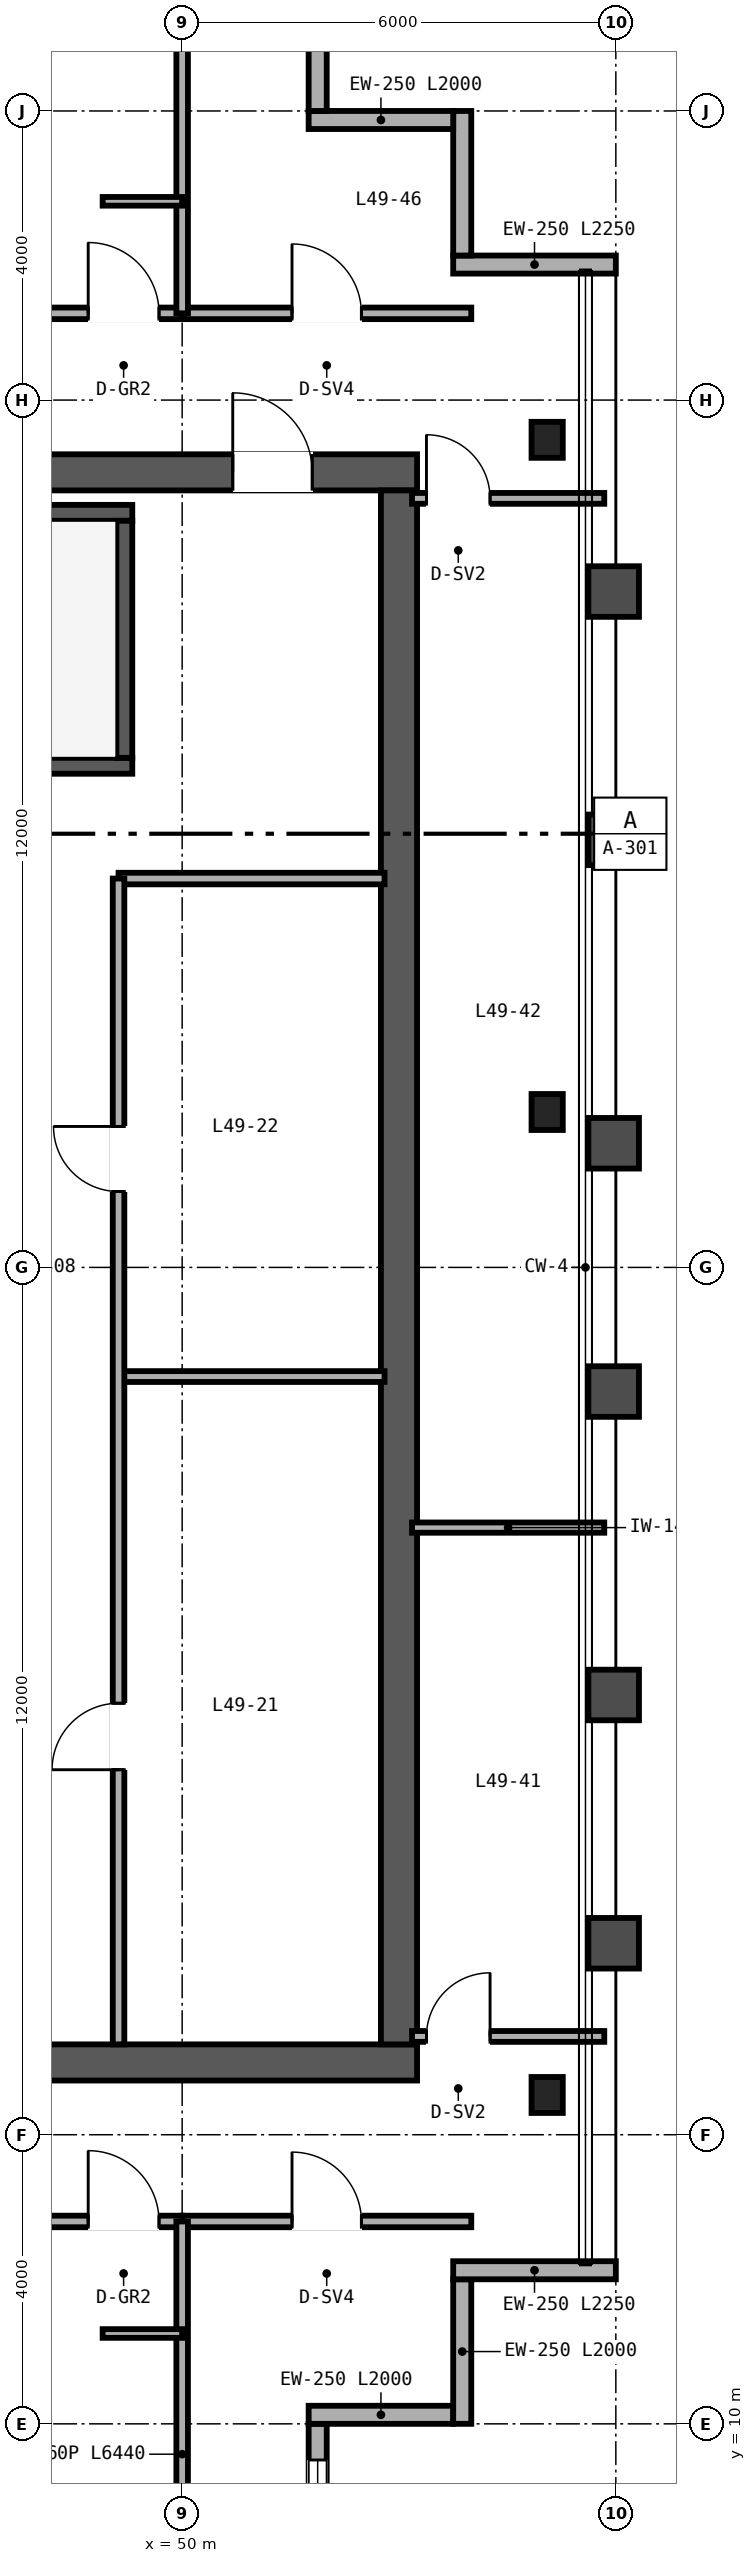
"""IFC4 building model, lengths in metres.
Left out: names, types, materials, properties, quantities, classifications, styles, units other than length and angle.
Written with IfcOpenShell. Run it as: python <this file> out.ifc"""

import sys

from ifc_helpers import new_model, si_unit, direction, frame, frame_2d, origin, origin_2d, place, context, subcontext, project, spatial, rectangle, i_section, extrude, source, transform, mapped, element, fill, save


model = new_model("IFC4")
c1 = context("Model", 3, precision=1e-05, world=origin(), true_north=direction((0.0, 1.0)))
c2 = subcontext(c1, "Body", "Model", "MODEL_VIEW")
j1 = project(units=[si_unit("LENGTHUNIT", "METRE"), si_unit("PLANEANGLEUNIT", "RADIAN")], contexts=[c1])
p1 = place(None, origin())
s1 = spatial("IfcSite", under=j1, at=p1, CompositionType="ELEMENT")
p2 = place(p1, origin())
s2 = spatial("IfcBuilding", under=s1, at=p2, CompositionType="ELEMENT")
p3 = place(p2, frame((0.0, 0.0, 195.6)))
s3 = spatial("IfcBuildingStorey", under=s2, at=p3, CompositionType="ELEMENT", Elevation=195.6)
p4 = place(p3, frame((40.75, 15.0, 0.0), z_axis=(0.0, 0.0, 1.0), x_axis=(1.0, 0.0, 0.0)))
e1 = element("IfcWall", 1, at=p4, inside=s3, PredefinedType="SHEAR", context=c2, shape_type="SweptSolid", body=[
    extrude(rectangle(XDim=12.5, YDim=0.5, at=frame_2d((6.25, 0.0))), origin(), (0.0, 0.0, 1.0), 3.37),
])
p5 = place(p4, frame((4.35, 0.0, 0.0)))
e2 = element("IfcOpeningElement", 2, at=p5, cuts=e1, PredefinedType="OPENING", context=c2, shape_type="SweptSolid", body=[
    extrude(rectangle(XDim=1.0, YDim=2.15, at=frame_2d((0.5, 1.075))), frame((0.0, 0.26, 0.0), z_axis=(0.0, -1.0, 0.0), x_axis=(1.0, 0.0, 0.0)), (0.0, 0.0, 1.0), 0.52),
])
p6 = place(p3, frame((40.75, 37.0, 0.0), z_axis=(0.0, 0.0, 1.0), x_axis=(1.0, 0.0, 0.0)))
e3 = element("IfcWall", 3, at=p6, inside=s3, PredefinedType="SHEAR", context=c2, shape_type="SweptSolid", body=[
    extrude(rectangle(XDim=12.5, YDim=0.5, at=frame_2d((6.25, 0.0))), origin(), (0.0, 0.0, 1.0), 3.37),
])
p7 = place(p6, frame((9.95, 0.0, 0.0)))
e4 = element("IfcOpeningElement", 4, at=p7, cuts=e3, PredefinedType="OPENING", context=c2, shape_type="SweptSolid", body=[
    extrude(rectangle(XDim=1.1, YDim=2.15, at=frame_2d((0.55, 1.075))), frame((0.0, 0.26, 0.0), z_axis=(0.0, -1.0, 0.0), x_axis=(1.0, 0.0, 0.0)), (0.0, 0.0, 1.0), 0.52),
])
p8 = place(p3, frame((53.0, 15.25, 0.0), z_axis=(0.0, 0.0, 1.0), x_axis=(0.0, 1.0, 0.0)))
e5 = element("IfcWall", 5, at=p8, inside=s3, PredefinedType="SHEAR", context=c2, shape_type="SweptSolid", body=[
    extrude(rectangle(XDim=21.5, YDim=0.5, at=frame_2d((10.75, 0.0))), origin(), (0.0, 0.0, 1.0), 3.37),
])
p9 = place(p3, frame((41.25, 32.94, 0.0), z_axis=(0.0, 0.0, 1.0), x_axis=(1.0, 0.0, 0.0)))
e6 = element("IfcWall", 6, at=p9, inside=s3, PredefinedType="SHEAR", context=c2, shape_type="SweptSolid", body=[
    extrude(rectangle(XDim=8.06, YDim=0.22, at=frame_2d((4.03, 0.0))), origin(), (0.0, 0.0, 1.0), 3.4),
])
p10 = place(p9, frame((0.67, 0.0, 0.0)))
e7 = element("IfcOpeningElement", 7, at=p10, cuts=e6, PredefinedType="OPENING", context=c2, shape_type="SweptSolid", body=[
    extrude(rectangle(XDim=1.05, YDim=2.15, at=frame_2d((0.525, 1.075))), frame((0.0, 0.12, 0.0), z_axis=(0.0, -1.0, 0.0), x_axis=(1.0, 0.0, 0.0)), (0.0, 0.0, 1.0), 0.24),
])
p11 = place(p3, frame((41.25, 36.44, 0.0), z_axis=(0.0, 0.0, 1.0), x_axis=(1.0, 0.0, 0.0)))
e8 = element("IfcWall", 8, at=p11, inside=s3, PredefinedType="SHEAR", context=c2, shape_type="SweptSolid", body=[
    extrude(rectangle(XDim=8.06, YDim=0.22, at=frame_2d((4.03, 0.0))), origin(), (0.0, 0.0, 1.0), 3.4),
])
p12 = place(p3, frame((49.2, 33.05, 0.0), z_axis=(0.0, 0.0, 1.0), x_axis=(0.0, 1.0, 0.0)))
e9 = element("IfcWall", 9, at=p12, inside=s3, PredefinedType="SHEAR", context=c2, shape_type="SweptSolid", body=[
    extrude(rectangle(XDim=3.28, YDim=0.22, at=frame_2d((1.64, 0.0))), origin(), (0.0, 0.0, 1.0), 3.4),
])
m1 = source(origin(), c2, "Body", "SweptSolid", [
    extrude(i_section(OverallWidth=0.432, OverallDepth=0.498, WebThickness=0.056, FlangeThickness=0.089, FilletRadius=0.025, at=origin_2d()), origin(), (0.0, 0.0, 1.0), 3.37),
])
for number, where, z_axis, x_axis in (
    (10, (55.05, 14.55, 0.0), (0.0, 0.0, 1.0), (1.0, 0.0, 0.0)),
    (11, (55.05, 28.15, 0.0), (0.0, 0.0, 1.0), (1.0, 0.0, 0.0)),
    (12, (55.05, 37.45, 0.0), (0.0, 0.0, 1.0), (1.0, 0.0, 0.0)),
):
    element("IfcColumn", number, at=place(p3, frame(where, z_axis=z_axis, x_axis=x_axis)), inside=s3, PredefinedType="COLUMN", context=c2, shape_type="MappedRepresentation", body=[
        mapped(m1, transform((0.0, 0.0, 0.0), scale=1.0)),
    ])
p13 = place(p3, frame((51.875, 8.0, 0.0), z_axis=(0.0, 0.0, 1.0), x_axis=(0.0, 1.0, 0.0)))
e13 = element("IfcWall", 13, at=p13, inside=s3, PredefinedType="SOLIDWALL", context=c2, shape_type="SweptSolid", body=[
    extrude(rectangle(XDim=2.0, YDim=0.25, at=frame_2d((1.0, 0.0))), origin(), (0.0, 0.0, 1.0), 3.37),
])
p14 = place(p13, frame((0.5, 0.0, 0.85)))
e14 = element("IfcOpeningElement", 14, at=p14, cuts=e13, PredefinedType="OPENING", context=c2, shape_type="SweptSolid", body=[
    extrude(rectangle(XDim=1.0, YDim=1.9, at=frame_2d((0.5, 0.95))), frame((0.0, 0.135, 0.0), z_axis=(0.0, -1.0, 0.0), x_axis=(1.0, 0.0, 0.0)), (0.0, 0.0, 1.0), 0.27),
])
for number, where, z_axis, x_axis in (
    (15, (51.75, 10.125, 0.0), (0.0, 0.0, 1.0), (1.0, 0.0, 0.0)),
    (16, (53.875, 10.0, 0.0), (0.0, 0.0, 1.0), (0.0, 1.0, 0.0)),
):
    element("IfcWall", number, at=place(p3, frame(where, z_axis=z_axis, x_axis=x_axis)), inside=s3, PredefinedType="SOLIDWALL", context=c2, shape_type="SweptSolid", body=[
        extrude(rectangle(XDim=2.0, YDim=0.25, at=frame_2d((1.0, 0.0))), origin(), (0.0, 0.0, 1.0), 3.37),
    ])
for number, where, z_axis, x_axis in (
    (17, (53.75, 12.125, 0.0), (0.0, 0.0, 1.0), (1.0, 0.0, 0.0)),
    (18, (56.0, 39.875, 0.0), (0.0, 0.0, 1.0), (-1.0, 0.0, 0.0)),
):
    element("IfcWall", number, at=place(p3, frame(where, z_axis=z_axis, x_axis=x_axis)), inside=s3, PredefinedType="SOLIDWALL", context=c2, shape_type="SweptSolid", body=[
        extrude(rectangle(XDim=2.25, YDim=0.25, at=frame_2d((1.125, 0.0))), origin(), (0.0, 0.0, 1.0), 3.37),
    ])
for number, where, z_axis, x_axis in (
    (19, (53.875, 40.0, 0.0), (0.0, 0.0, 1.0), (0.0, 1.0, 0.0)),
    (20, (53.75, 41.875, 0.0), (0.0, 0.0, 1.0), (-1.0, 0.0, 0.0)),
    (21, (51.875, 42.0, 0.0), (0.0, 0.0, 1.0), (0.0, 1.0, 0.0)),
):
    element("IfcWall", number, at=place(p3, frame(where, z_axis=z_axis, x_axis=x_axis)), inside=s3, PredefinedType="SOLIDWALL", context=c2, shape_type="SweptSolid", body=[
        extrude(rectangle(XDim=2.0, YDim=0.25, at=frame_2d((1.0, 0.0))), origin(), (0.0, 0.0, 1.0), 3.37),
    ])
p15 = place(p3, frame((49.12, 31.38, 0.0), z_axis=(0.0, 0.0, 1.0), x_axis=(1.0, 0.0, 0.0)))
e22 = element("IfcWall", 22, at=p15, inside=s3, PredefinedType="PARTITIONING", context=c2, shape_type="SweptSolid", body=[
    extrude(rectangle(XDim=3.68, YDim=0.16, at=frame_2d((1.84, 0.0))), origin(), (0.0, 0.0, 1.0), 2.47),
])
p16 = place(p3, frame((49.12, 24.49, 0.0), z_axis=(0.0, 0.0, 1.0), x_axis=(1.0, 0.0, 0.0)))
e23 = element("IfcWall", 23, at=p16, inside=s3, PredefinedType="PARTITIONING", context=c2, shape_type="SweptSolid", body=[
    extrude(rectangle(XDim=3.68, YDim=0.15, at=frame_2d((1.84, 0.0))), origin(), (0.0, 0.0, 1.0), 3.37),
])
p17 = place(p3, frame((49.12, 15.25, 0.0), z_axis=(0.0, 0.0, 1.0), x_axis=(0.0, 1.0, 0.0)))
e24 = element("IfcWall", 24, at=p17, inside=s3, PredefinedType="PARTITIONING", context=c2, shape_type="SweptSolid", body=[
    extrude(rectangle(XDim=16.13, YDim=0.16, at=frame_2d((8.065, 0.0))), origin(), (0.0, 0.0, 1.0), 2.443),
])
p18 = place(p17, frame((3.8, 0.0, 0.0)))
e25 = element("IfcOpeningElement", 25, at=p18, cuts=e24, PredefinedType="OPENING", context=c2, shape_type="SweptSolid", body=[
    extrude(rectangle(XDim=0.92, YDim=2.15, at=frame_2d((0.46, 1.075))), frame((0.0, 0.09, 0.0), z_axis=(0.0, -1.0, 0.0), x_axis=(1.0, 0.0, 0.0)), (0.0, 0.0, 1.0), 0.18),
])
p19 = place(p17, frame((11.8, 0.0, 0.0)))
e26 = element("IfcOpeningElement", 26, at=p19, cuts=e24, PredefinedType="OPENING", context=c2, shape_type="SweptSolid", body=[
    extrude(rectangle(XDim=0.9, YDim=2.15, at=frame_2d((0.45, 1.075))), frame((0.0, 0.09, 0.0), z_axis=(0.0, -1.0, 0.0), x_axis=(1.0, 0.0, 0.0)), (0.0, 0.0, 1.0), 0.18),
])
p20 = place(p3, frame((53.18, 15.36, 0.0), z_axis=(0.0, 0.0, 1.0), x_axis=(1.0, 0.0, 0.0)))
e27 = element("IfcWall", 27, at=p20, inside=s3, PredefinedType="PARTITIONING", context=c2, shape_type="SweptSolid", body=[
    extrude(rectangle(XDim=2.66, YDim=0.15, at=frame_2d((1.33, 0.0))), origin(), (0.0, 0.0, 1.0), 2.591),
])
p21 = place(p20, frame((0.2, 0.0, 0.0)))
e28 = element("IfcOpeningElement", 28, at=p21, cuts=e27, PredefinedType="OPENING", context=c2, shape_type="SweptSolid", body=[
    extrude(rectangle(XDim=0.88, YDim=2.15, at=frame_2d((0.44, 1.075))), frame((0.0, 0.085, 0.0), z_axis=(0.0, -1.0, 0.0), x_axis=(1.0, 0.0, 0.0)), (0.0, 0.0, 1.0), 0.17),
])
p22 = place(p3, frame((53.18, 36.64, 0.0), z_axis=(0.0, 0.0, 1.0), x_axis=(1.0, 0.0, 0.0)))
e29 = element("IfcWall", 29, at=p22, inside=s3, PredefinedType="PARTITIONING", context=c2, shape_type="SweptSolid", body=[
    extrude(rectangle(XDim=2.66, YDim=0.15, at=frame_2d((1.33, 0.0))), origin(), (0.0, 0.0, 1.0), 2.753),
])
p23 = place(p22, frame((0.2, 0.0, 0.0)))
e30 = element("IfcOpeningElement", 30, at=p23, cuts=e29, PredefinedType="OPENING", context=c2, shape_type="SweptSolid", body=[
    extrude(rectangle(XDim=0.88, YDim=2.15, at=frame_2d((0.44, 1.075))), frame((0.0, 0.085, 0.0), z_axis=(0.0, -1.0, 0.0), x_axis=(1.0, 0.0, 0.0)), (0.0, 0.0, 1.0), 0.17),
])
p24 = place(p3, frame((53.18, 22.4, 0.0), z_axis=(0.0, 0.0, 1.0), x_axis=(1.0, 0.0, 0.0)))
e31 = element("IfcWall", 31, at=p24, inside=s3, PredefinedType="PARTITIONING", context=c2, shape_type="SweptSolid", body=[
    extrude(rectangle(XDim=2.66, YDim=0.142, at=frame_2d((1.33, 0.0))), origin(), (0.0, 0.0, 1.0), 2.591),
])
p25 = place(p3, frame((50.0, 12.8, 0.0), z_axis=(0.0, 0.0, 1.0), x_axis=(1.0, 0.0, 0.0)))
e32 = element("IfcWall", 32, at=p25, inside=s3, PredefinedType="PARTITIONING", context=c2, shape_type="SweptSolid", body=[
    extrude(rectangle(XDim=4.0, YDim=0.16, at=frame_2d((2.0, 0.0))), origin(), (0.0, 0.0, 1.0), 3.37),
])
p26 = place(p25, frame((1.52, 0.0, 0.0)))
e33 = element("IfcOpeningElement", 33, at=p26, cuts=e32, PredefinedType="OPENING", context=c2, shape_type="SweptSolid", body=[
    extrude(rectangle(XDim=0.96, YDim=2.15, at=frame_2d((0.48, 1.075))), frame((0.0, 0.09, 0.0), z_axis=(0.0, -1.0, 0.0), x_axis=(1.0, 0.0, 0.0)), (0.0, 0.0, 1.0), 0.18),
])
p27 = place(p3, frame((50.0, 39.2, 0.0), z_axis=(0.0, 0.0, 1.0), x_axis=(1.0, 0.0, 0.0)))
e34 = element("IfcWall", 34, at=p27, inside=s3, PredefinedType="PARTITIONING", context=c2, shape_type="SweptSolid", body=[
    extrude(rectangle(XDim=4.0, YDim=0.16, at=frame_2d((2.0, 0.0))), origin(), (0.0, 0.0, 1.0), 3.37),
])
p28 = place(p27, frame((1.52, 0.0, 0.0)))
e35 = element("IfcOpeningElement", 35, at=p28, cuts=e34, PredefinedType="OPENING", context=c2, shape_type="SweptSolid", body=[
    extrude(rectangle(XDim=0.96, YDim=2.15, at=frame_2d((0.48, 1.075))), frame((0.0, 0.09, 0.0), z_axis=(0.0, -1.0, 0.0), x_axis=(1.0, 0.0, 0.0)), (0.0, 0.0, 1.0), 0.18),
])
p29 = place(p3, frame((38.0, 12.8, 0.0), z_axis=(0.0, 0.0, 1.0), x_axis=(1.0, 0.0, 0.0)))
e36 = element("IfcWall", 36, at=p29, inside=s3, PredefinedType="PARTITIONING", context=c2, shape_type="SweptSolid", body=[
    extrude(rectangle(XDim=12.0, YDim=0.16, at=frame_2d((6.0, 0.0))), origin(), (0.0, 0.0, 1.0), 2.913),
])
p30 = place(p29, frame((10.7, 0.0, 0.0)))
e37 = element("IfcOpeningElement", 37, at=p30, cuts=e36, PredefinedType="OPENING", context=c2, shape_type="SweptSolid", body=[
    extrude(rectangle(XDim=0.98, YDim=2.2, at=frame_2d((0.49, 1.1))), frame((0.0, 0.09, 0.0), z_axis=(0.0, -1.0, 0.0), x_axis=(1.0, 0.0, 0.0)), (0.0, 0.0, 1.0), 0.18),
])
p31 = place(p3, frame((50.0, 6.36, 0.0), z_axis=(0.0, 0.0, 1.0), x_axis=(0.0, 1.0, 0.0)))
e38 = element("IfcWall", 38, at=p31, inside=s3, PredefinedType="PARTITIONING", context=c2, shape_type="SweptSolid", body=[
    extrude(rectangle(XDim=6.44, YDim=0.16, at=frame_2d((3.22, 0.0))), origin(), (0.0, 0.0, 1.0), 2.677),
])
p32 = place(p3, frame((48.9, 11.25, 0.0), z_axis=(0.0, 0.0, 1.0), x_axis=(1.0, 0.0, 0.0)))
e39 = element("IfcWall", 39, at=p32, inside=s3, PredefinedType="PARTITIONING", context=c2, shape_type="SweptSolid", body=[
    extrude(rectangle(XDim=1.1, YDim=0.12, at=frame_2d((0.55, 0.0))), origin(), (0.0, 0.0, 1.0), 3.37),
])
p33 = place(p3, frame((14.0, 39.2, 0.0), z_axis=(0.0, 0.0, 1.0), x_axis=(1.0, 0.0, 0.0)))
e40 = element("IfcWall", 40, at=p33, inside=s3, PredefinedType="PARTITIONING", context=c2, shape_type="SweptSolid", body=[
    extrude(rectangle(XDim=36.0, YDim=0.16, at=frame_2d((18.0, 0.0))), origin(), (0.0, 0.0, 1.0), 2.913),
])
p34 = place(p33, frame((5.9, 0.0, 0.0)))
e41 = element("IfcOpeningElement", 41, at=p34, cuts=e40, PredefinedType="OPENING", context=c2, shape_type="SweptSolid", body=[
    extrude(rectangle(XDim=0.98, YDim=2.2, at=frame_2d((0.49, 1.1))), frame((0.0, 0.09, 0.0), z_axis=(0.0, -1.0, 0.0), x_axis=(1.0, 0.0, 0.0)), (0.0, 0.0, 1.0), 0.18),
])
p35 = place(p33, frame((10.32, 0.0, 0.0)))
e42 = element("IfcOpeningElement", 42, at=p35, cuts=e40, PredefinedType="OPENING", context=c2, shape_type="SweptSolid", body=[
    extrude(rectangle(XDim=0.96, YDim=2.15, at=frame_2d((0.48, 1.075))), frame((0.0, 0.09, 0.0), z_axis=(0.0, -1.0, 0.0), x_axis=(1.0, 0.0, 0.0)), (0.0, 0.0, 1.0), 0.18),
])
p36 = place(p33, frame((17.52, 0.0, 0.0)))
e43 = element("IfcOpeningElement", 43, at=p36, cuts=e40, PredefinedType="OPENING", context=c2, shape_type="SweptSolid", body=[
    extrude(rectangle(XDim=0.96, YDim=2.15, at=frame_2d((0.48, 1.075))), frame((0.0, 0.09, 0.0), z_axis=(0.0, -1.0, 0.0), x_axis=(1.0, 0.0, 0.0)), (0.0, 0.0, 1.0), 0.18),
])
p37 = place(p33, frame((24.72, 0.0, 0.0)))
e44 = element("IfcOpeningElement", 44, at=p37, cuts=e40, PredefinedType="OPENING", context=c2, shape_type="SweptSolid", body=[
    extrude(rectangle(XDim=0.96, YDim=2.15, at=frame_2d((0.48, 1.075))), frame((0.0, 0.09, 0.0), z_axis=(0.0, -1.0, 0.0), x_axis=(1.0, 0.0, 0.0)), (0.0, 0.0, 1.0), 0.18),
])
p38 = place(p33, frame((34.7, 0.0, 0.0)))
e45 = element("IfcOpeningElement", 45, at=p38, cuts=e40, PredefinedType="OPENING", context=c2, shape_type="SweptSolid", body=[
    extrude(rectangle(XDim=0.98, YDim=2.2, at=frame_2d((0.49, 1.1))), frame((0.0, 0.09, 0.0), z_axis=(0.0, -1.0, 0.0), x_axis=(1.0, 0.0, 0.0)), (0.0, 0.0, 1.0), 0.18),
])
p39 = place(p3, frame((50.0, 39.2, 0.0), z_axis=(0.0, 0.0, 1.0), x_axis=(0.0, 1.0, 0.0)))
e46 = element("IfcWall", 46, at=p39, inside=s3, PredefinedType="PARTITIONING", context=c2, shape_type="SweptSolid", body=[
    extrude(rectangle(XDim=6.44, YDim=0.16, at=frame_2d((3.22, 0.0))), origin(), (0.0, 0.0, 1.0), 2.677),
])
p40 = place(p3, frame((48.9, 40.75, 0.0), z_axis=(0.0, 0.0, 1.0), x_axis=(1.0, 0.0, 0.0)))
e47 = element("IfcWall", 47, at=p40, inside=s3, PredefinedType="PARTITIONING", context=c2, shape_type="SweptSolid", body=[
    extrude(rectangle(XDim=1.1, YDim=0.12, at=frame_2d((0.55, 0.0))), origin(), (0.0, 0.0, 1.0), 3.37),
])
m2 = source(origin(), c2, "Body", "SweptSolid", [
    extrude(rectangle(XDim=1.0, YDim=1.9, at=frame_2d((0.5, 0.95))), frame((0.0, 0.03, 0.0), z_axis=(0.0, -1.0, 0.0), x_axis=(1.0, 0.0, 0.0)), (0.0, 0.0, 1.0), 0.06),
])
p41 = place(p14, origin())
e48 = element("IfcWindow", 48, at=p41, inside=s3, PartitioningType="SINGLE_PANEL", PredefinedType="WINDOW", context=c2, shape_type="MappedRepresentation", body=[
    mapped(m2, transform((0.0, 0.0, 0.0), scale=1.0)),
])
fill(e14, e48)
m3 = source(origin(), c2, "Body", "SweptSolid", [
    extrude(rectangle(XDim=1.1, YDim=2.15, at=frame_2d((0.55, 1.075))), frame((0.0, 0.025, 0.0), z_axis=(0.0, -1.0, 0.0), x_axis=(1.0, 0.0, 0.0)), (0.0, 0.0, 1.0), 0.05),
])
p42 = place(p7, origin())
e49 = element("IfcDoor", 49, at=p42, inside=s3, OperationType="SINGLE_SWING_LEFT", PredefinedType="DOOR", context=c2, shape_type="MappedRepresentation", body=[
    mapped(m3, transform((0.0, 0.0, 0.0), scale=1.0)),
])
fill(e4, e49)
m4 = source(origin(), c2, "Body", "SweptSolid", [
    extrude(rectangle(XDim=0.92, YDim=2.15, at=frame_2d((0.46, 1.075))), frame((0.0, 0.025, 0.0), z_axis=(0.0, -1.0, 0.0), x_axis=(1.0, 0.0, 0.0)), (0.0, 0.0, 1.0), 0.05),
])
p43 = place(p18, origin())
e50 = element("IfcDoor", 50, at=p43, inside=s3, OperationType="SINGLE_SWING_LEFT", PredefinedType="DOOR", context=c2, shape_type="MappedRepresentation", body=[
    mapped(m4, transform((0.0, 0.0, 0.0), scale=1.0)),
])
fill(e25, e50)
m5 = source(origin(), c2, "Body", "SweptSolid", [
    extrude(rectangle(XDim=0.9, YDim=2.15, at=frame_2d((0.45, 1.075))), frame((0.0, 0.025, 0.0), z_axis=(0.0, -1.0, 0.0), x_axis=(1.0, 0.0, 0.0)), (0.0, 0.0, 1.0), 0.05),
])
p44 = place(p19, origin())
e51 = element("IfcDoor", 51, at=p44, inside=s3, OperationType="SINGLE_SWING_RIGHT", PredefinedType="DOOR", context=c2, shape_type="MappedRepresentation", body=[
    mapped(m5, transform((0.0, 0.0, 0.0), scale=1.0)),
])
fill(e26, e51)
m6 = source(origin(), c2, "Body", "SweptSolid", [
    extrude(rectangle(XDim=0.88, YDim=2.15, at=frame_2d((0.44, 1.075))), frame((0.0, 0.025, 0.0), z_axis=(0.0, -1.0, 0.0), x_axis=(1.0, 0.0, 0.0)), (0.0, 0.0, 1.0), 0.05),
])
p45 = place(p21, origin())
e52 = element("IfcDoor", 52, at=p45, inside=s3, OperationType="SINGLE_SWING_RIGHT", PredefinedType="DOOR", context=c2, shape_type="MappedRepresentation", body=[
    mapped(m6, transform((0.0, 0.0, 0.0), scale=1.0)),
])
fill(e28, e52)
p46 = place(p23, origin())
e53 = element("IfcDoor", 53, at=p46, inside=s3, OperationType="SINGLE_SWING_LEFT", PredefinedType="DOOR", context=c2, shape_type="MappedRepresentation", body=[
    mapped(m6, transform((0.0, 0.0, 0.0), scale=1.0)),
])
fill(e30, e53)
m7 = source(origin(), c2, "Body", "SweptSolid", [
    extrude(rectangle(XDim=0.96, YDim=2.15, at=frame_2d((0.48, 1.075))), frame((0.0, 0.025, 0.0), z_axis=(0.0, -1.0, 0.0), x_axis=(1.0, 0.0, 0.0)), (0.0, 0.0, 1.0), 0.05),
])
p47 = place(p26, origin())
e54 = element("IfcDoor", 54, at=p47, inside=s3, OperationType="SINGLE_SWING_LEFT", PredefinedType="DOOR", context=c2, shape_type="MappedRepresentation", body=[
    mapped(m7, transform((0.0, 0.0, 0.0), scale=1.0)),
])
fill(e33, e54)
p48 = place(p28, origin())
e55 = element("IfcDoor", 55, at=p48, inside=s3, OperationType="SINGLE_SWING_LEFT", PredefinedType="DOOR", context=c2, shape_type="MappedRepresentation", body=[
    mapped(m7, transform((0.0, 0.0, 0.0), scale=1.0)),
])
fill(e35, e55)
m8 = source(origin(), c2, "Body", "SweptSolid", [
    extrude(rectangle(XDim=0.98, YDim=2.2, at=frame_2d((0.49, 1.1))), frame((0.0, 0.025, 0.0), z_axis=(0.0, -1.0, 0.0), x_axis=(1.0, 0.0, 0.0)), (0.0, 0.0, 1.0), 0.05),
])
p49 = place(p30, origin())
e56 = element("IfcDoor", 56, at=p49, inside=s3, OperationType="SINGLE_SWING_LEFT", PredefinedType="DOOR", context=c2, shape_type="MappedRepresentation", body=[
    mapped(m8, transform((0.0, 0.0, 0.0), scale=1.0)),
])
fill(e37, e56)
p50 = place(p38, origin())
e57 = element("IfcDoor", 57, at=p50, inside=s3, OperationType="SINGLE_SWING_LEFT", PredefinedType="DOOR", context=c2, shape_type="MappedRepresentation", body=[
    mapped(m8, transform((0.0, 0.0, 0.0), scale=1.0)),
])
fill(e45, e57)
save(model, sys.argv[1])
